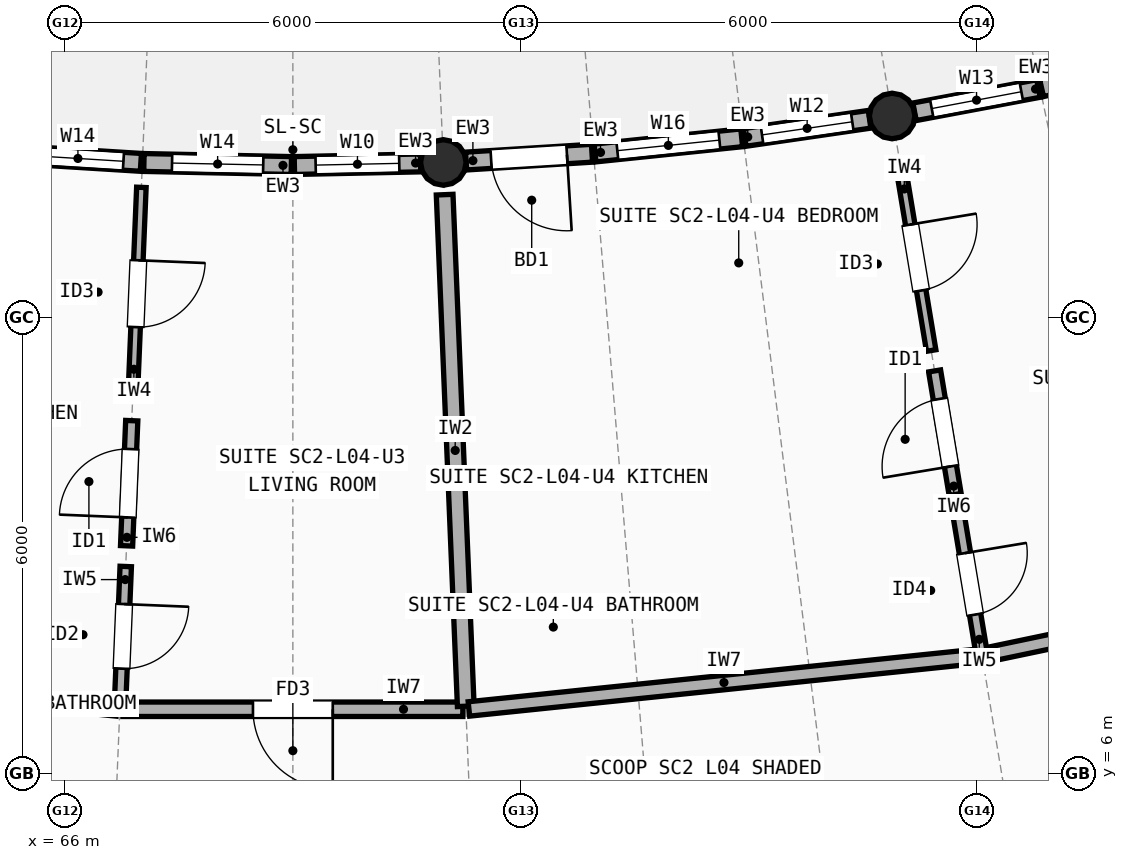
"""IFC4 building model, lengths in metres.
Left out: names, types, materials, properties, quantities, classifications, styles, units other than length and angle.
Written with IfcOpenShell. Run it as: python <this file> out.ifc"""

import sys

from ifc_helpers import new_model, si_unit, direction, frame, frame_2d, origin, origin_2d, place, context, subcontext, project, spatial, rectangle, circle, extrude, element, fill, save


model = new_model("IFC4")
c1 = context("Model", 3, precision=1e-05, world=origin(), true_north=direction((0.0, 1.0)))
c2 = subcontext(c1, "Body", "Model", "MODEL_VIEW")
j1 = project(units=[si_unit("LENGTHUNIT", "METRE"), si_unit("PLANEANGLEUNIT", "RADIAN")], contexts=[c1])
p1 = place(None, origin())
s1 = spatial("IfcSite", under=j1, at=p1, CompositionType="ELEMENT")
p2 = place(p1, origin())
s2 = spatial("IfcBuilding", under=s1, at=p2, CompositionType="ELEMENT")
p3 = place(p2, frame((0.0, 0.0, 14.1)))
s3 = spatial("IfcBuildingStorey", under=s2, at=p3, CompositionType="ELEMENT", Elevation=14.1)
for number, where, z_axis, x_axis in (
    (1, (70.979, 14.041, 0.0), (0.0, 0.0, 1.0), (1.0, 0.0, 0.0)),
    (2, (76.885, 14.652, 0.0), (0.0, 0.0, 1.0), (1.0, 0.0, 0.0)),
):
    element("IfcColumn", number, at=place(p3, frame(where, z_axis=z_axis, x_axis=x_axis)), inside=s3, PredefinedType="COLUMN", context=c2, shape_type="SweptSolid", body=[
        extrude(circle(Radius=0.3, at=origin_2d()), origin(), (0.0, 0.0, 1.0), 2.948),
    ])
p4 = place(p3, frame((65.344, 14.145, 0.0), z_axis=(0.0, 0.0, 1.0), x_axis=(0.998081651949, -0.061911356339, 0.0)))
e3 = element("IfcWall", 3, at=p4, inside=s3, PredefinedType="STANDARD", context=c2, shape_type="SweptSolid", body=[
    extrude(rectangle(XDim=1.66, YDim=0.235, at=frame_2d((0.83, 0.0))), origin(), (0.0, 0.0, 1.0), 2.684),
])
p5 = place(p4, frame((0.23, 0.0, 0.85)))
e4 = element("IfcOpeningElement", 4, at=p5, cuts=e3, PredefinedType="OPENING", context=c2, shape_type="SweptSolid", body=[
    extrude(rectangle(XDim=1.2, YDim=1.5, at=frame_2d((0.6, 0.75))), frame((0.0, 0.127, 0.0), z_axis=(0.0, -1.0, 0.0), x_axis=(1.0, 0.0, 0.0)), (0.0, 0.0, 1.0), 0.255),
])
p6 = place(p3, frame((67.04, 14.04, 0.0), z_axis=(0.0, 0.0, 1.0), x_axis=(0.999789612304, -0.020511731505, 0.0)))
e5 = element("IfcWall", 5, at=p6, inside=s3, PredefinedType="STANDARD", context=c2, shape_type="SweptSolid", body=[
    extrude(rectangle(XDim=1.94, YDim=0.235, at=frame_2d((0.97, 0.0))), origin(), (0.0, 0.0, 1.0), 2.684),
])
p7 = place(p6, frame((0.37, 0.0, 0.85)))
e6 = element("IfcOpeningElement", 6, at=p7, cuts=e5, PredefinedType="OPENING", context=c2, shape_type="SweptSolid", body=[
    extrude(rectangle(XDim=1.2, YDim=1.5, at=frame_2d((0.6, 0.75))), frame((0.0, 0.127, 0.0), z_axis=(0.0, -1.0, 0.0), x_axis=(1.0, 0.0, 0.0)), (0.0, 0.0, 1.0), 0.255),
])
p8 = place(p3, frame((69.02, 14.0, 0.0), z_axis=(0.0, 0.0, 1.0), x_axis=(0.999788004991, 0.020589926552, 0.0)))
e7 = element("IfcWall", 7, at=p8, inside=s3, PredefinedType="STANDARD", context=c2, shape_type="SweptSolid", body=[
    extrude(rectangle(XDim=1.66, YDim=0.235, at=frame_2d((0.83, 0.0))), origin(), (0.0, 0.0, 1.0), 2.684),
])
p9 = place(p8, frame((0.28, 0.0, 0.85)))
e8 = element("IfcOpeningElement", 8, at=p9, cuts=e7, PredefinedType="OPENING", context=c2, shape_type="SweptSolid", body=[
    extrude(rectangle(XDim=1.1, YDim=1.45, at=frame_2d((0.55, 0.725))), frame((0.0, 0.127, 0.0), z_axis=(0.0, -1.0, 0.0), x_axis=(1.0, 0.0, 0.0)), (0.0, 0.0, 1.0), 0.255),
])
p10 = place(p3, frame((71.279, 14.059, 0.0), z_axis=(0.0, 0.0, 1.0), x_axis=(0.998081088149, 0.061920444756, 0.0)))
e9 = element("IfcWall", 9, at=p10, inside=s3, PredefinedType="STANDARD", context=c2, shape_type="SweptSolid", body=[
    extrude(rectangle(XDim=1.66, YDim=0.235, at=frame_2d((0.83, 0.0))), origin(), (0.0, 0.0, 1.0), 2.684),
])
p11 = place(p10, frame((0.33, 0.0, 0.0)))
e10 = element("IfcOpeningElement", 10, at=p11, cuts=e9, PredefinedType="OPENING", context=c2, shape_type="SweptSolid", body=[
    extrude(rectangle(XDim=1.0, YDim=2.15, at=frame_2d((0.5, 1.075))), frame((0.0, 0.127, 0.0), z_axis=(0.0, -1.0, 0.0), x_axis=(1.0, 0.0, 0.0)), (0.0, 0.0, 1.0), 0.255),
])
p12 = place(p3, frame((72.976, 14.165, 0.0), z_axis=(0.0, 0.0, 1.0), x_axis=(0.994688684624, 0.10292920228, 0.0)))
e11 = element("IfcWall", 11, at=p12, inside=s3, PredefinedType="STANDARD", context=c2, shape_type="SweptSolid", body=[
    extrude(rectangle(XDim=1.94, YDim=0.235, at=frame_2d((0.97, 0.0))), origin(), (0.0, 0.0, 1.0), 2.684),
])
p13 = place(p12, frame((0.295, 0.0, 0.85)))
e12 = element("IfcOpeningElement", 12, at=p13, cuts=e11, PredefinedType="OPENING", context=c2, shape_type="SweptSolid", body=[
    extrude(rectangle(XDim=1.35, YDim=1.5, at=frame_2d((0.675, 0.75))), frame((0.0, 0.127, 0.0), z_axis=(0.0, -1.0, 0.0), x_axis=(1.0, 0.0, 0.0)), (0.0, 0.0, 1.0), 0.255),
])
p14 = place(p3, frame((74.945, 14.37, 0.0), z_axis=(0.0, 0.0, 1.0), x_axis=(0.989602429917, 0.14382986721, 0.0)))
e13 = element("IfcWall", 13, at=p14, inside=s3, PredefinedType="STANDARD", context=c2, shape_type="SweptSolid", body=[
    extrude(rectangle(XDim=1.66, YDim=0.235, at=frame_2d((0.83, 0.0))), origin(), (0.0, 0.0, 1.0), 2.684),
])
p15 = place(p14, frame((0.23, 0.0, 0.85)))
e14 = element("IfcOpeningElement", 14, at=p15, cuts=e13, PredefinedType="OPENING", context=c2, shape_type="SweptSolid", body=[
    extrude(rectangle(XDim=1.2, YDim=1.35, at=frame_2d((0.6, 0.675))), frame((0.0, 0.127, 0.0), z_axis=(0.0, -1.0, 0.0), x_axis=(1.0, 0.0, 0.0)), (0.0, 0.0, 1.0), 0.255),
])
p16 = place(p3, frame((77.179, 14.708, 0.0), z_axis=(0.0, 0.0, 1.0), x_axis=(0.982820537681, 0.184563784945, 0.0)))
e15 = element("IfcWall", 15, at=p16, inside=s3, PredefinedType="STANDARD", context=c2, shape_type="SweptSolid", body=[
    extrude(rectangle(XDim=1.66, YDim=0.235, at=frame_2d((0.83, 0.0))), origin(), (0.0, 0.0, 1.0), 2.684),
])
p17 = place(p16, frame((0.23, 0.0, 0.85)))
e16 = element("IfcOpeningElement", 16, at=p17, cuts=e15, PredefinedType="OPENING", context=c2, shape_type="SweptSolid", body=[
    extrude(rectangle(XDim=1.2, YDim=1.45, at=frame_2d((0.6, 0.725))), frame((0.0, 0.127, 0.0), z_axis=(0.0, -1.0, 0.0), x_axis=(1.0, 0.0, 0.0)), (0.0, 0.0, 1.0), 0.255),
])
p18 = place(p3, frame((78.85, 15.022, 0.0), z_axis=(0.0, 0.0, 1.0), x_axis=(0.974359373104, 0.224997360081, 0.0)))
e17 = element("IfcWall", 17, at=p18, inside=s3, PredefinedType="STANDARD", context=c2, shape_type="SweptSolid", body=[
    extrude(rectangle(XDim=1.94, YDim=0.235, at=frame_2d((0.97, 0.0))), origin(), (0.0, 0.0, 1.0), 2.684),
])
p19 = place(p18, frame((0.42, 0.0, 0.0)))
e18 = element("IfcOpeningElement", 18, at=p19, cuts=e17, PredefinedType="OPENING", context=c2, shape_type="SweptSolid", body=[
    extrude(rectangle(XDim=1.1, YDim=2.15, at=frame_2d((0.55, 1.075))), frame((0.0, 0.127, 0.0), z_axis=(0.0, -1.0, 0.0), x_axis=(1.0, 0.0, 0.0)), (0.0, 0.0, 1.0), 0.255),
])
p20 = place(p3, frame((59.972, 7.546, 0.0), z_axis=(0.0, 0.0, 1.0), x_axis=(0.994686939686, -0.10294606364, 0.0)))
e19 = element("IfcWall", 19, at=p20, inside=s3, PredefinedType="SOLIDWALL", context=c2, shape_type="SweptSolid", body=[
    extrude(rectangle(XDim=6.747, YDim=0.19, at=frame_2d((3.374, 0.0))), origin(), (0.0, 0.0, 1.0), 2.722),
])
p21 = place(p3, frame((66.763, 6.847, 0.0), z_axis=(0.0, 0.0, 1.0), x_axis=(1.0, 0.0, 0.0)))
e20 = element("IfcWall", 20, at=p21, inside=s3, PredefinedType="SOLIDWALL", context=c2, shape_type="SweptSolid", body=[
    extrude(rectangle(XDim=4.473, YDim=0.19, at=frame_2d((2.237, 0.0))), origin(), (0.0, 0.0, 1.0), 2.762),
])
p22 = place(p21, frame((1.711, 0.0, 0.0)))
e21 = element("IfcOpeningElement", 21, at=p22, cuts=e20, PredefinedType="OPENING", context=c2, shape_type="SweptSolid", body=[
    extrude(rectangle(XDim=1.05, YDim=2.15, at=frame_2d((0.525, 1.075))), frame((0.0, 0.105, 0.0), z_axis=(0.0, -1.0, 0.0), x_axis=(1.0, 0.0, 0.0)), (0.0, 0.0, 1.0), 0.21),
])
p23 = place(p3, frame((67.007, 13.713, 0.0), z_axis=(0.0, 0.0, 1.0), x_axis=(-0.041246071378, -0.999149018713, 0.0)))
e22 = element("IfcWall", 22, at=p23, inside=s3, PredefinedType="PARTITIONING", context=c2, shape_type="SweptSolid", body=[
    extrude(rectangle(XDim=2.8, YDim=0.125, at=frame_2d((1.4, 0.0))), origin(), (0.0, 0.0, 1.0), 2.742),
])
p24 = place(p23, frame((0.96, 0.0, 0.0)))
e23 = element("IfcOpeningElement", 23, at=p24, cuts=e22, PredefinedType="OPENING", context=c2, shape_type="SweptSolid", body=[
    extrude(rectangle(XDim=0.88, YDim=2.1, at=frame_2d((0.44, 1.05))), frame((0.0, 0.073, 0.0), z_axis=(0.0, -1.0, 0.0), x_axis=(1.0, 0.0, 0.0)), (0.0, 0.0, 1.0), 0.145),
])
p25 = place(p3, frame((66.88, 10.644, 0.0), z_axis=(0.0, 0.0, 1.0), x_axis=(-0.04118075259, -0.999151713013, 0.0)))
e24 = element("IfcWall", 24, at=p25, inside=s3, PredefinedType="PLUMBINGWALL", context=c2, shape_type="SweptSolid", body=[
    extrude(rectangle(XDim=1.648, YDim=0.16, at=frame_2d((0.824, 0.0))), origin(), (0.0, 0.0, 1.0), 2.742),
])
p26 = place(p25, frame((0.374, 0.0, 0.0)))
e25 = element("IfcOpeningElement", 25, at=p26, cuts=e24, PredefinedType="OPENING", context=c2, shape_type="SweptSolid", body=[
    extrude(rectangle(XDim=0.9, YDim=2.1, at=frame_2d((0.45, 1.05))), frame((0.0, 0.09, 0.0), z_axis=(0.0, -1.0, 0.0), x_axis=(1.0, 0.0, 0.0)), (0.0, 0.0, 1.0), 0.18),
])
p27 = place(p3, frame((66.801, 8.725, 0.0), z_axis=(0.0, 0.0, 1.0), x_axis=(-0.04126627959, -0.999148184289, 0.0)))
e26 = element("IfcWall", 26, at=p27, inside=s3, PredefinedType="PARTITIONING", context=c2, shape_type="SweptSolid", body=[
    extrude(rectangle(XDim=1.84, YDim=0.15, at=frame_2d((0.92, 0.0))), origin(), (0.0, 0.0, 1.0), 2.742),
])
p28 = place(p27, frame((0.495, 0.0, 0.0)))
e27 = element("IfcOpeningElement", 27, at=p28, cuts=e26, PredefinedType="OPENING", context=c2, shape_type="SweptSolid", body=[
    extrude(rectangle(XDim=0.85, YDim=2.1, at=frame_2d((0.425, 1.05))), frame((0.0, 0.085, 0.0), z_axis=(0.0, -1.0, 0.0), x_axis=(1.0, 0.0, 0.0)), (0.0, 0.0, 1.0), 0.17),
])
p29 = place(p3, frame((70.997, 13.617, 0.0), z_axis=(0.0, 0.0, 1.0), x_axis=(0.04124611243, -0.999149017019, 0.0)))
e28 = element("IfcWall", 28, at=p29, inside=s3, PredefinedType="SOLIDWALL", context=c2, shape_type="SweptSolid", body=[
    extrude(rectangle(XDim=6.736, YDim=0.22, at=frame_2d((3.368, 0.0))), origin(), (0.0, 0.0, 1.0), 2.722),
])
p30 = place(p3, frame((71.316, 6.851, 0.0), z_axis=(0.0, 0.0, 1.0), x_axis=(0.994686939686, 0.10294606364, 0.0)))
e29 = element("IfcWall", 29, at=p30, inside=s3, PredefinedType="SOLIDWALL", context=c2, shape_type="SweptSolid", body=[
    extrude(rectangle(XDim=6.747, YDim=0.19, at=frame_2d((3.374, 0.0))), origin(), (0.0, 0.0, 1.0), 2.742),
])
p31 = place(p3, frame((78.107, 7.558, 0.0), z_axis=(0.0, 0.0, 1.0), x_axis=(0.978806148413, 0.204788973894, 0.0)))
e30 = element("IfcWall", 30, at=p31, inside=s3, PredefinedType="SOLIDWALL", context=c2, shape_type="SweptSolid", body=[
    extrude(rectangle(XDim=4.473, YDim=0.19, at=frame_2d((2.236, 0.0))), origin(), (0.0, 0.0, 1.0), 2.742),
])
p32 = place(p31, frame((1.737, 0.0, 0.0)))
e31 = element("IfcOpeningElement", 31, at=p32, cuts=e30, PredefinedType="OPENING", context=c2, shape_type="SweptSolid", body=[
    extrude(rectangle(XDim=1.0, YDim=2.15, at=frame_2d((0.5, 1.075))), frame((0.0, 0.105, 0.0), z_axis=(0.0, -1.0, 0.0), x_axis=(1.0, 0.0, 0.0)), (0.0, 0.0, 1.0), 0.21),
])
p33 = place(p3, frame((76.991, 14.013, 0.0), z_axis=(0.0, 0.0, 1.0), x_axis=(0.16420741421, -0.986425833562, 0.0)))
e32 = element("IfcWall", 32, at=p33, inside=s3, PredefinedType="PARTITIONING", context=c2, shape_type="SweptSolid", body=[
    extrude(rectangle(XDim=2.48, YDim=0.125, at=frame_2d((1.24, 0.0))), origin(), (0.0, 0.0, 1.0), 2.722),
])
p34 = place(p33, frame((0.8, 0.0, 0.0)))
e33 = element("IfcOpeningElement", 33, at=p34, cuts=e32, PredefinedType="OPENING", context=c2, shape_type="SweptSolid", body=[
    extrude(rectangle(XDim=0.88, YDim=2.1, at=frame_2d((0.44, 1.05))), frame((0.0, 0.073, 0.0), z_axis=(0.0, -1.0, 0.0), x_axis=(1.0, 0.0, 0.0)), (0.0, 0.0, 1.0), 0.145),
])
p35 = place(p3, frame((77.443, 11.298, 0.0), z_axis=(0.0, 0.0, 1.0), x_axis=(0.164158726706, -0.986433937193, 0.0)))
e34 = element("IfcWall", 34, at=p35, inside=s3, PredefinedType="PLUMBINGWALL", context=c2, shape_type="SweptSolid", body=[
    extrude(rectangle(XDim=1.648, YDim=0.16, at=frame_2d((0.824, 0.0))), origin(), (0.0, 0.0, 1.0), 2.722),
])
p36 = place(p35, frame((0.374, 0.0, 0.0)))
e35 = element("IfcOpeningElement", 35, at=p36, cuts=e34, PredefinedType="OPENING", context=c2, shape_type="SweptSolid", body=[
    extrude(rectangle(XDim=0.9, YDim=2.1, at=frame_2d((0.45, 1.05))), frame((0.0, 0.09, 0.0), z_axis=(0.0, -1.0, 0.0), x_axis=(1.0, 0.0, 0.0)), (0.0, 0.0, 1.0), 0.18),
])
p37 = place(p3, frame((77.759, 9.404, 0.0), z_axis=(0.0, 0.0, 1.0), x_axis=(0.164269882379, -0.986415432636, 0.0)))
e36 = element("IfcWall", 36, at=p37, inside=s3, PredefinedType="PARTITIONING", context=c2, shape_type="SweptSolid", body=[
    extrude(rectangle(XDim=1.84, YDim=0.15, at=frame_2d((0.92, 0.0))), origin(), (0.0, 0.0, 1.0), 2.722),
])
p38 = place(p37, frame((0.51, 0.0, 0.0)))
e37 = element("IfcOpeningElement", 37, at=p38, cuts=e36, PredefinedType="OPENING", context=c2, shape_type="SweptSolid", body=[
    extrude(rectangle(XDim=0.82, YDim=2.08, at=frame_2d((0.41, 1.04))), frame((0.0, 0.085, 0.0), z_axis=(0.0, -1.0, 0.0), x_axis=(1.0, 0.0, 0.0)), (0.0, 0.0, 1.0), 0.17),
])
p39 = place(p5, origin())
e38 = element("IfcWindow", 38, at=p39, inside=s3, PartitioningType="SINGLE_PANEL", PredefinedType="WINDOW", context=c2, shape_type="SweptSolid", body=[
    extrude(rectangle(XDim=1.2, YDim=1.5, at=frame_2d((0.6, 0.75))), frame((0.0, 0.03, 0.0), z_axis=(0.0, -1.0, 0.0), x_axis=(1.0, 0.0, 0.0)), (0.0, 0.0, 1.0), 0.06),
])
fill(e4, e38)
p40 = place(p7, origin())
e39 = element("IfcWindow", 39, at=p40, inside=s3, PartitioningType="SINGLE_PANEL", PredefinedType="WINDOW", context=c2, shape_type="SweptSolid", body=[
    extrude(rectangle(XDim=1.2, YDim=1.5, at=frame_2d((0.6, 0.75))), frame((0.0, 0.03, 0.0), z_axis=(0.0, -1.0, 0.0), x_axis=(1.0, 0.0, 0.0)), (0.0, 0.0, 1.0), 0.06),
])
fill(e6, e39)
p41 = place(p9, origin())
e40 = element("IfcWindow", 40, at=p41, inside=s3, PartitioningType="SINGLE_PANEL", PredefinedType="WINDOW", context=c2, shape_type="SweptSolid", body=[
    extrude(rectangle(XDim=1.1, YDim=1.45, at=frame_2d((0.55, 0.725))), frame((0.0, 0.03, 0.0), z_axis=(0.0, -1.0, 0.0), x_axis=(1.0, 0.0, 0.0)), (0.0, 0.0, 1.0), 0.06),
])
fill(e8, e40)
p42 = place(p11, origin())
e41 = element("IfcDoor", 41, at=p42, inside=s3, OperationType="SINGLE_SWING_RIGHT", PredefinedType="DOOR", context=c2, shape_type="SweptSolid", body=[
    extrude(rectangle(XDim=1.0, YDim=2.15, at=frame_2d((0.5, 1.075))), frame((0.0, 0.025, 0.0), z_axis=(0.0, -1.0, 0.0), x_axis=(1.0, 0.0, 0.0)), (0.0, 0.0, 1.0), 0.05),
])
fill(e10, e41)
p43 = place(p13, origin())
e42 = element("IfcWindow", 42, at=p43, inside=s3, PartitioningType="SINGLE_PANEL", PredefinedType="WINDOW", context=c2, shape_type="SweptSolid", body=[
    extrude(rectangle(XDim=1.35, YDim=1.5, at=frame_2d((0.675, 0.75))), frame((0.0, 0.03, 0.0), z_axis=(0.0, -1.0, 0.0), x_axis=(1.0, 0.0, 0.0)), (0.0, 0.0, 1.0), 0.06),
])
fill(e12, e42)
p44 = place(p15, origin())
e43 = element("IfcWindow", 43, at=p44, inside=s3, PartitioningType="SINGLE_PANEL", PredefinedType="WINDOW", context=c2, shape_type="SweptSolid", body=[
    extrude(rectangle(XDim=1.2, YDim=1.35, at=frame_2d((0.6, 0.675))), frame((0.0, 0.03, 0.0), z_axis=(0.0, -1.0, 0.0), x_axis=(1.0, 0.0, 0.0)), (0.0, 0.0, 1.0), 0.06),
])
fill(e14, e43)
p45 = place(p17, origin())
e44 = element("IfcWindow", 44, at=p45, inside=s3, PartitioningType="SINGLE_PANEL", PredefinedType="WINDOW", context=c2, shape_type="SweptSolid", body=[
    extrude(rectangle(XDim=1.2, YDim=1.45, at=frame_2d((0.6, 0.725))), frame((0.0, 0.03, 0.0), z_axis=(0.0, -1.0, 0.0), x_axis=(1.0, 0.0, 0.0)), (0.0, 0.0, 1.0), 0.06),
])
fill(e16, e44)
p46 = place(p22, origin())
e45 = element("IfcDoor", 45, at=p46, inside=s3, OperationType="SINGLE_SWING_RIGHT", PredefinedType="DOOR", context=c2, shape_type="SweptSolid", body=[
    extrude(rectangle(XDim=1.05, YDim=2.15, at=frame_2d((0.525, 1.075))), frame((0.0, 0.025, 0.0), z_axis=(0.0, -1.0, 0.0), x_axis=(1.0, 0.0, 0.0)), (0.0, 0.0, 1.0), 0.05),
])
fill(e21, e45)
p47 = place(p24, origin())
e46 = element("IfcDoor", 46, at=p47, inside=s3, OperationType="SINGLE_SWING_LEFT", PredefinedType="DOOR", context=c2, shape_type="SweptSolid", body=[
    extrude(rectangle(XDim=0.88, YDim=2.1, at=frame_2d((0.44, 1.05))), frame((0.0, 0.025, 0.0), z_axis=(0.0, -1.0, 0.0), x_axis=(1.0, 0.0, 0.0)), (0.0, 0.0, 1.0), 0.05),
])
fill(e23, e46)
p48 = place(p26, origin())
e47 = element("IfcDoor", 47, at=p48, inside=s3, OperationType="SINGLE_SWING_RIGHT", PredefinedType="DOOR", context=c2, shape_type="SweptSolid", body=[
    extrude(rectangle(XDim=0.9, YDim=2.1, at=frame_2d((0.45, 1.05))), frame((0.0, 0.025, 0.0), z_axis=(0.0, -1.0, 0.0), x_axis=(1.0, 0.0, 0.0)), (0.0, 0.0, 1.0), 0.05),
])
fill(e25, e47)
p49 = place(p28, origin())
e48 = element("IfcDoor", 48, at=p49, inside=s3, OperationType="SINGLE_SWING_LEFT", PredefinedType="DOOR", context=c2, shape_type="SweptSolid", body=[
    extrude(rectangle(XDim=0.85, YDim=2.1, at=frame_2d((0.425, 1.05))), frame((0.0, 0.025, 0.0), z_axis=(0.0, -1.0, 0.0), x_axis=(1.0, 0.0, 0.0)), (0.0, 0.0, 1.0), 0.05),
])
fill(e27, e48)
p50 = place(p34, origin())
e49 = element("IfcDoor", 49, at=p50, inside=s3, OperationType="SINGLE_SWING_LEFT", PredefinedType="DOOR", context=c2, shape_type="SweptSolid", body=[
    extrude(rectangle(XDim=0.88, YDim=2.1, at=frame_2d((0.44, 1.05))), frame((0.0, 0.025, 0.0), z_axis=(0.0, -1.0, 0.0), x_axis=(1.0, 0.0, 0.0)), (0.0, 0.0, 1.0), 0.05),
])
fill(e33, e49)
p51 = place(p36, origin())
e50 = element("IfcDoor", 50, at=p51, inside=s3, OperationType="SINGLE_SWING_RIGHT", PredefinedType="DOOR", context=c2, shape_type="SweptSolid", body=[
    extrude(rectangle(XDim=0.9, YDim=2.1, at=frame_2d((0.45, 1.05))), frame((0.0, 0.025, 0.0), z_axis=(0.0, -1.0, 0.0), x_axis=(1.0, 0.0, 0.0)), (0.0, 0.0, 1.0), 0.05),
])
fill(e35, e50)
p52 = place(p38, origin())
e51 = element("IfcDoor", 51, at=p52, inside=s3, OperationType="SINGLE_SWING_LEFT", PredefinedType="DOOR", context=c2, shape_type="SweptSolid", body=[
    extrude(rectangle(XDim=0.82, YDim=2.08, at=frame_2d((0.41, 1.04))), frame((0.0, 0.025, 0.0), z_axis=(0.0, -1.0, 0.0), x_axis=(1.0, 0.0, 0.0)), (0.0, 0.0, 1.0), 0.05),
])
fill(e37, e51)
save(model, sys.argv[1])
